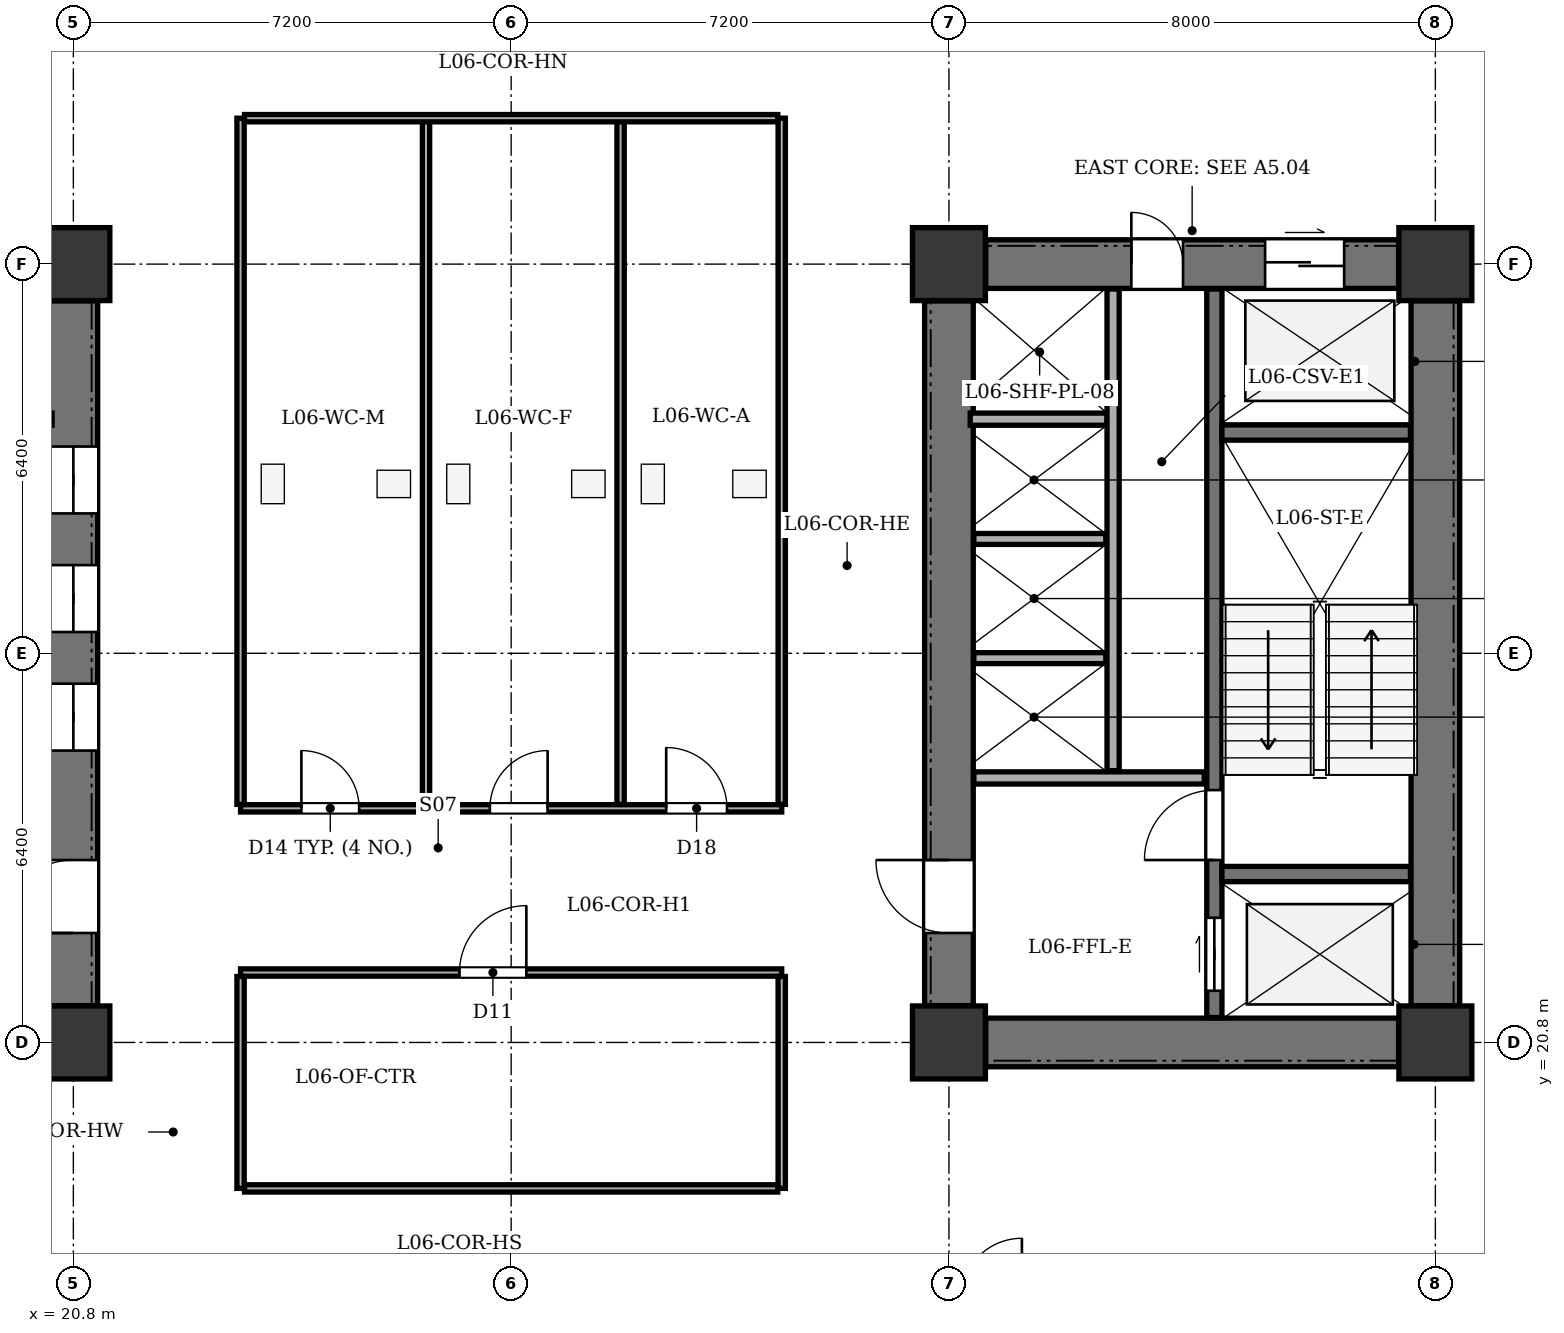
"""IFC4 building model, lengths in metres.
Left out: names, types, materials, properties, quantities, classifications, styles, units other than length and angle.
Written with IfcOpenShell. Run it as: python <this file> out.ifc"""

import sys

from ifc_helpers import new_model, si_unit, direction, frame, frame_2d, origin, origin_2d, place, context, subcontext, project, spatial, rectangle, extrude, element, fill, save


model = new_model("IFC4")
c1 = context("Model", 3, precision=1e-05, world=origin(), true_north=direction((0.0, 1.0)))
c2 = subcontext(c1, "Body", "Model", "MODEL_VIEW")
j1 = project(units=[si_unit("LENGTHUNIT", "METRE"), si_unit("PLANEANGLEUNIT", "RADIAN")], contexts=[c1])
p1 = place(None, origin())
s1 = spatial("IfcSite", under=j1, at=p1, CompositionType="ELEMENT")
p2 = place(p1, origin())
s2 = spatial("IfcBuilding", under=s1, at=p2, CompositionType="ELEMENT")
p3 = place(p2, frame((0.0, 0.0, 28.2)))
s3 = spatial("IfcBuildingStorey", under=s2, at=p3, CompositionType="ELEMENT", Elevation=28.2)
for number, where, z_axis, x_axis in (
    (1, (20.8, 20.8, 0.0), (0.0, 0.0, 1.0), (1.0, 0.0, 0.0)),
    (2, (20.8, 33.6, 0.0), (0.0, 0.0, 1.0), (1.0, 0.0, 0.0)),
    (3, (35.2, 20.8, 0.0), (0.0, 0.0, 1.0), (1.0, 0.0, 0.0)),
    (4, (43.2, 20.8, 0.0), (0.0, 0.0, 1.0), (1.0, 0.0, 0.0)),
    (5, (35.2, 33.6, 0.0), (0.0, 0.0, 1.0), (1.0, 0.0, 0.0)),
    (6, (43.2, 33.6, 0.0), (0.0, 0.0, 1.0), (1.0, 0.0, 0.0)),
):
    element("IfcColumn", number, at=place(p3, frame(where, z_axis=z_axis, x_axis=x_axis)), inside=s3, PredefinedType="COLUMN", context=c2, shape_type="SweptSolid", body=[
        extrude(rectangle(XDim=1.2, YDim=1.2, at=origin_2d()), origin(), (0.0, 0.0, 1.0), 3.9),
    ])
p4 = place(p3, frame((20.8, 21.405, 0.0), z_axis=(0.0, 0.0, 1.0), x_axis=(0.0, 1.0, 0.0)))
e7 = element("IfcWall", 7, at=p4, inside=s3, PredefinedType="SHEAR", context=c2, shape_type="SweptSolid", body=[
    extrude(rectangle(XDim=11.59, YDim=0.8, at=frame_2d((5.795, 0.0))), origin(), (0.0, 0.0, 1.0), 3.6),
])
p5 = place(p4, frame((1.195, 0.0, 0.0)))
e8 = element("IfcOpeningElement", 8, at=p5, cuts=e7, PredefinedType="OPENING", context=c2, shape_type="SweptSolid", body=[
    extrude(rectangle(XDim=1.2, YDim=2.15, at=frame_2d((0.6, 1.075))), frame((0.0, 0.41, 0.0), z_axis=(0.0, -1.0, 0.0), x_axis=(1.0, 0.0, 0.0)), (0.0, 0.0, 1.0), 0.82),
])
p6 = place(p4, frame((4.195, 0.0, 0.0)))
e9 = element("IfcOpeningElement", 9, at=p6, cuts=e7, PredefinedType="OPENING", context=c2, shape_type="SweptSolid", body=[
    extrude(rectangle(XDim=1.1, YDim=2.1, at=frame_2d((0.55, 1.05))), frame((0.0, 0.41, 0.0), z_axis=(0.0, -1.0, 0.0), x_axis=(1.0, 0.0, 0.0)), (0.0, 0.0, 1.0), 0.82),
])
p7 = place(p4, frame((6.145, 0.0, 0.0)))
e10 = element("IfcOpeningElement", 10, at=p7, cuts=e7, PredefinedType="OPENING", context=c2, shape_type="SweptSolid", body=[
    extrude(rectangle(XDim=1.1, YDim=2.1, at=frame_2d((0.55, 1.05))), frame((0.0, 0.41, 0.0), z_axis=(0.0, -1.0, 0.0), x_axis=(1.0, 0.0, 0.0)), (0.0, 0.0, 1.0), 0.82),
])
p8 = place(p4, frame((8.095, 0.0, 0.0)))
e11 = element("IfcOpeningElement", 11, at=p8, cuts=e7, PredefinedType="OPENING", context=c2, shape_type="SweptSolid", body=[
    extrude(rectangle(XDim=1.1, YDim=2.1, at=frame_2d((0.55, 1.05))), frame((0.0, 0.41, 0.0), z_axis=(0.0, -1.0, 0.0), x_axis=(1.0, 0.0, 0.0)), (0.0, 0.0, 1.0), 0.82),
])
p9 = place(p3, frame((43.2, 21.405, 0.0), z_axis=(0.0, 0.0, 1.0), x_axis=(0.0, 1.0, 0.0)))
e12 = element("IfcWall", 12, at=p9, inside=s3, PredefinedType="SHEAR", context=c2, shape_type="SweptSolid", body=[
    extrude(rectangle(XDim=11.59, YDim=0.8, at=frame_2d((5.795, 0.0))), origin(), (0.0, 0.0, 1.0), 3.6),
])
p10 = place(p3, frame((35.805, 20.8, 0.0), z_axis=(0.0, 0.0, 1.0), x_axis=(1.0, 0.0, 0.0)))
e13 = element("IfcWall", 13, at=p10, inside=s3, PredefinedType="SHEAR", context=c2, shape_type="SweptSolid", body=[
    extrude(rectangle(XDim=6.79, YDim=0.8, at=frame_2d((3.395, 0.0))), origin(), (0.0, 0.0, 1.0), 3.6),
])
p11 = place(p3, frame((35.805, 33.6, 0.0), z_axis=(0.0, 0.0, 1.0), x_axis=(1.0, 0.0, 0.0)))
e14 = element("IfcWall", 14, at=p11, inside=s3, PredefinedType="SHEAR", context=c2, shape_type="SweptSolid", body=[
    extrude(rectangle(XDim=6.79, YDim=0.8, at=frame_2d((3.395, 0.0))), origin(), (0.0, 0.0, 1.0), 3.6),
])
p12 = place(p11, frame((4.595, 0.0, 0.0)))
e15 = element("IfcOpeningElement", 15, at=p12, cuts=e14, PredefinedType="OPENING", context=c2, shape_type="SweptSolid", body=[
    extrude(rectangle(XDim=1.3, YDim=2.15, at=frame_2d((0.65, 1.075))), frame((0.0, 0.41, 0.0), z_axis=(0.0, -1.0, 0.0), x_axis=(1.0, 0.0, 0.0)), (0.0, 0.0, 1.0), 0.82),
])
p13 = place(p11, frame((2.395, 0.0, 0.0)))
e16 = element("IfcOpeningElement", 16, at=p13, cuts=e14, PredefinedType="OPENING", context=c2, shape_type="SweptSolid", body=[
    extrude(rectangle(XDim=0.85, YDim=2.02, at=frame_2d((0.425, 1.01))), frame((0.0, 0.41, 0.0), z_axis=(0.0, -1.0, 0.0), x_axis=(1.0, 0.0, 0.0)), (0.0, 0.0, 1.0), 0.82),
])
p14 = place(p3, frame((35.2, 21.405, 0.0), z_axis=(0.0, 0.0, 1.0), x_axis=(0.0, 1.0, 0.0)))
e17 = element("IfcWall", 17, at=p14, inside=s3, PredefinedType="SHEAR", context=c2, shape_type="SweptSolid", body=[
    extrude(rectangle(XDim=11.59, YDim=0.8, at=frame_2d((5.795, 0.0))), origin(), (0.0, 0.0, 1.0), 3.6),
])
p15 = place(p14, frame((1.195, 0.0, 0.0)))
e18 = element("IfcOpeningElement", 18, at=p15, cuts=e17, PredefinedType="OPENING", context=c2, shape_type="SweptSolid", body=[
    extrude(rectangle(XDim=1.2, YDim=2.15, at=frame_2d((0.6, 1.075))), frame((0.0, 0.41, 0.0), z_axis=(0.0, -1.0, 0.0), x_axis=(1.0, 0.0, 0.0)), (0.0, 0.0, 1.0), 0.82),
])
p16 = place(p3, frame((39.565, 21.21, 0.0), z_axis=(0.0, 0.0, 1.0), x_axis=(0.0, 1.0, 0.0)))
e19 = element("IfcWall", 19, at=p16, inside=s3, PredefinedType="SHEAR", context=c2, shape_type="SweptSolid", body=[
    extrude(rectangle(XDim=11.98, YDim=0.25, at=frame_2d((5.99, 0.0))), origin(), (0.0, 0.0, 1.0), 3.6),
])
p17 = place(p16, frame((0.44, 0.0, 0.0)))
e20 = element("IfcOpeningElement", 20, at=p17, cuts=e19, PredefinedType="OPENING", context=c2, shape_type="SweptSolid", body=[
    extrude(rectangle(XDim=1.2, YDim=2.15, at=frame_2d((0.6, 1.075))), frame((0.0, 0.135, 0.0), z_axis=(0.0, -1.0, 0.0), x_axis=(1.0, 0.0, 0.0)), (0.0, 0.0, 1.0), 0.27),
])
p18 = place(p16, frame((2.59, 0.0, 0.0)))
e21 = element("IfcOpeningElement", 21, at=p18, cuts=e19, PredefinedType="OPENING", context=c2, shape_type="SweptSolid", body=[
    extrude(rectangle(XDim=1.15, YDim=2.15, at=frame_2d((0.575, 1.075))), frame((0.0, 0.135, 0.0), z_axis=(0.0, -1.0, 0.0), x_axis=(1.0, 0.0, 0.0)), (0.0, 0.0, 1.0), 0.27),
])
for number, where, z_axis, x_axis in (
    (22, (39.69, 23.57, 0.0), (0.0, 0.0, 1.0), (1.0, 0.0, 0.0)),
    (23, (39.69, 30.83, 0.0), (0.0, 0.0, 1.0), (1.0, 0.0, 0.0)),
):
    element("IfcWall", number, at=place(p3, frame(where, z_axis=z_axis, x_axis=x_axis)), inside=s3, PredefinedType="SHEAR", context=c2, shape_type="SweptSolid", body=[
        extrude(rectangle(XDim=3.1, YDim=0.25, at=frame_2d((1.55, 0.0))), origin(), (0.0, 0.0, 1.0), 3.6),
    ])
p19 = place(p3, frame((35.61, 25.15, 0.0), z_axis=(0.0, 0.0, 1.0), x_axis=(1.0, 0.0, 0.0)))
e24 = element("IfcWall", 24, at=p19, inside=s3, PredefinedType="SOLIDWALL", context=c2, shape_type="SweptSolid", body=[
    extrude(rectangle(XDim=3.79, YDim=0.2, at=frame_2d((1.895, 0.0))), origin(), (0.0, 0.0, 1.0), 3.6),
])
p20 = place(p3, frame((35.55, 31.05, 0.0), z_axis=(0.0, 0.0, 1.0), x_axis=(1.0, 0.0, 0.0)))
e25 = element("IfcWall", 25, at=p20, inside=s3, PredefinedType="SOLIDWALL", context=c2, shape_type="SweptSolid", body=[
    extrude(rectangle(XDim=2.25, YDim=0.2, at=frame_2d((1.125, 0.0))), origin(), (0.0, 0.0, 1.0), 3.6),
])
p21 = place(p3, frame((37.9, 25.27, 0.0), z_axis=(0.0, 0.0, 1.0), x_axis=(0.0, 1.0, 0.0)))
e26 = element("IfcWall", 26, at=p21, inside=s3, PredefinedType="SOLIDWALL", context=c2, shape_type="SweptSolid", body=[
    extrude(rectangle(XDim=7.92, YDim=0.2, at=frame_2d((3.96, 0.0))), origin(), (0.0, 0.0, 1.0), 3.6),
])
for number, where, z_axis, x_axis in (
    (27, (35.61, 27.12, 0.0), (0.0, 0.0, 1.0), (1.0, 0.0, 0.0)),
    (28, (35.61, 29.08, 0.0), (0.0, 0.0, 1.0), (1.0, 0.0, 0.0)),
):
    element("IfcWall", number, at=place(p3, frame(where, z_axis=z_axis, x_axis=x_axis)), inside=s3, PredefinedType="PARTITIONING", context=c2, shape_type="SweptSolid", body=[
        extrude(rectangle(XDim=2.17, YDim=0.18, at=frame_2d((1.085, 0.0))), origin(), (0.0, 0.0, 1.0), 3.6),
    ])
p22 = place(p3, frame((23.55, 24.65, 0.0), z_axis=(0.0, 0.0, 1.0), x_axis=(1.0, 0.0, 0.0)))
e29 = element("IfcWall", 29, at=p22, inside=s3, PredefinedType="PARTITIONING", context=c2, shape_type="SweptSolid", body=[
    extrude(rectangle(XDim=8.9, YDim=0.12, at=frame_2d((4.45, 0.0))), origin(), (0.0, 0.0, 1.0), 3.135),
])
p23 = place(p22, frame((1.0, 0.0, 0.0)))
e30 = element("IfcOpeningElement", 30, at=p23, cuts=e29, PredefinedType="OPENING", context=c2, shape_type="SweptSolid", body=[
    extrude(rectangle(XDim=0.95, YDim=2.1, at=frame_2d((0.475, 1.05))), frame((0.0, 0.07, 0.0), z_axis=(0.0, -1.0, 0.0), x_axis=(1.0, 0.0, 0.0)), (0.0, 0.0, 1.0), 0.14),
])
p24 = place(p22, frame((4.1, 0.0, 0.0)))
e31 = element("IfcOpeningElement", 31, at=p24, cuts=e29, PredefinedType="OPENING", context=c2, shape_type="SweptSolid", body=[
    extrude(rectangle(XDim=0.95, YDim=2.1, at=frame_2d((0.475, 1.05))), frame((0.0, 0.07, 0.0), z_axis=(0.0, -1.0, 0.0), x_axis=(1.0, 0.0, 0.0)), (0.0, 0.0, 1.0), 0.14),
])
p25 = place(p22, frame((7.0, 0.0, 0.0)))
e32 = element("IfcOpeningElement", 32, at=p25, cuts=e29, PredefinedType="OPENING", context=c2, shape_type="SweptSolid", body=[
    extrude(rectangle(XDim=1.0, YDim=2.1, at=frame_2d((0.5, 1.05))), frame((0.0, 0.07, 0.0), z_axis=(0.0, -1.0, 0.0), x_axis=(1.0, 0.0, 0.0)), (0.0, 0.0, 1.0), 0.14),
])
for number, where, z_axis, x_axis in (
    (33, (23.55, 24.715, 0.0), (0.0, 0.0, 1.0), (0.0, 1.0, 0.0)),
    (34, (32.45, 24.715, 0.0), (0.0, 0.0, 1.0), (0.0, 1.0, 0.0)),
    (35, (26.6, 24.715, 0.0), (0.0, 0.0, 1.0), (0.0, 1.0, 0.0)),
):
    element("IfcWall", number, at=place(p3, frame(where, z_axis=z_axis, x_axis=x_axis)), inside=s3, PredefinedType="PARTITIONING", context=c2, shape_type="SweptSolid", body=[
        extrude(rectangle(XDim=11.285, YDim=0.12, at=frame_2d((5.643, 0.0))), origin(), (0.0, 0.0, 1.0), 3.6),
    ])
p26 = place(p3, frame((29.8, 24.715, 0.0), z_axis=(0.0, 0.0, 1.0), x_axis=(0.0, 1.0, 0.0)))
e36 = element("IfcWall", 36, at=p26, inside=s3, PredefinedType="PARTITIONING", context=c2, shape_type="SweptSolid", body=[
    extrude(rectangle(XDim=11.285, YDim=0.12, at=frame_2d((5.643, 0.0))), origin(), (0.0, 0.0, 1.0), 3.135),
])
p27 = place(p3, frame((23.615, 36.0, 0.0), z_axis=(0.0, 0.0, 1.0), x_axis=(1.0, 0.0, 0.0)))
e37 = element("IfcWall", 37, at=p27, inside=s3, PredefinedType="PARTITIONING", context=c2, shape_type="SweptSolid", body=[
    extrude(rectangle(XDim=8.77, YDim=0.12, at=frame_2d((4.385, 0.0))), origin(), (0.0, 0.0, 1.0), 3.6),
])
p28 = place(p3, frame((23.55, 21.95, 0.0), z_axis=(0.0, 0.0, 1.0), x_axis=(1.0, 0.0, 0.0)))
e38 = element("IfcWall", 38, at=p28, inside=s3, PredefinedType="PARTITIONING", context=c2, shape_type="SweptSolid", body=[
    extrude(rectangle(XDim=8.9, YDim=0.12, at=frame_2d((4.45, 0.0))), origin(), (0.0, 0.0, 1.0), 3.135),
])
p29 = place(p28, frame((3.6, 0.0, 0.0)))
e39 = element("IfcOpeningElement", 39, at=p29, cuts=e38, PredefinedType="OPENING", context=c2, shape_type="SweptSolid", body=[
    extrude(rectangle(XDim=1.1, YDim=2.15, at=frame_2d((0.55, 1.075))), frame((0.0, 0.07, 0.0), z_axis=(0.0, -1.0, 0.0), x_axis=(1.0, 0.0, 0.0)), (0.0, 0.0, 1.0), 0.14),
])
for number, where, z_axis, x_axis in (
    (40, (23.55, 18.4, 0.0), (0.0, 0.0, 1.0), (0.0, 1.0, 0.0)),
    (41, (32.45, 18.4, 0.0), (0.0, 0.0, 1.0), (0.0, 1.0, 0.0)),
):
    element("IfcWall", number, at=place(p3, frame(where, z_axis=z_axis, x_axis=x_axis)), inside=s3, PredefinedType="PARTITIONING", context=c2, shape_type="SweptSolid", body=[
        extrude(rectangle(XDim=3.485, YDim=0.12, at=frame_2d((1.743, 0.0))), origin(), (0.0, 0.0, 1.0), 3.6),
    ])
p30 = place(p3, frame((23.615, 18.4, 0.0), z_axis=(0.0, 0.0, 1.0), x_axis=(1.0, 0.0, 0.0)))
e42 = element("IfcWall", 42, at=p30, inside=s3, PredefinedType="PARTITIONING", context=c2, shape_type="SweptSolid", body=[
    extrude(rectangle(XDim=8.77, YDim=0.12, at=frame_2d((4.385, 0.0))), origin(), (0.0, 0.0, 1.0), 3.6),
])
p31 = place(p5, origin())
e43 = element("IfcDoor", 43, at=p31, inside=s3, OperationType="SINGLE_SWING_LEFT", PredefinedType="DOOR", context=c2, shape_type="SweptSolid", body=[
    extrude(rectangle(XDim=1.2, YDim=2.15, at=frame_2d((0.6, 1.075))), frame((0.0, 0.025, 0.0), z_axis=(0.0, -1.0, 0.0), x_axis=(1.0, 0.0, 0.0)), (0.0, 0.0, 1.0), 0.05),
])
fill(e8, e43)
p32 = place(p6, origin())
e44 = element("IfcDoor", 44, at=p32, inside=s3, OperationType="DOUBLE_DOOR_SLIDING", PredefinedType="DOOR", context=c2, shape_type="SweptSolid", body=[
    extrude(rectangle(XDim=1.1, YDim=2.1, at=frame_2d((0.55, 1.05))), frame((0.0, 0.025, 0.0), z_axis=(0.0, -1.0, 0.0), x_axis=(1.0, 0.0, 0.0)), (0.0, 0.0, 1.0), 0.05),
])
fill(e9, e44)
p33 = place(p7, origin())
e45 = element("IfcDoor", 45, at=p33, inside=s3, OperationType="DOUBLE_DOOR_SLIDING", PredefinedType="DOOR", context=c2, shape_type="SweptSolid", body=[
    extrude(rectangle(XDim=1.1, YDim=2.1, at=frame_2d((0.55, 1.05))), frame((0.0, 0.025, 0.0), z_axis=(0.0, -1.0, 0.0), x_axis=(1.0, 0.0, 0.0)), (0.0, 0.0, 1.0), 0.05),
])
fill(e10, e45)
p34 = place(p8, origin())
e46 = element("IfcDoor", 46, at=p34, inside=s3, OperationType="DOUBLE_DOOR_SLIDING", PredefinedType="DOOR", context=c2, shape_type="SweptSolid", body=[
    extrude(rectangle(XDim=1.1, YDim=2.1, at=frame_2d((0.55, 1.05))), frame((0.0, 0.025, 0.0), z_axis=(0.0, -1.0, 0.0), x_axis=(1.0, 0.0, 0.0)), (0.0, 0.0, 1.0), 0.05),
])
fill(e11, e46)
p35 = place(p12, origin())
e47 = element("IfcDoor", 47, at=p35, inside=s3, OperationType="DOUBLE_DOOR_SLIDING", PredefinedType="DOOR", context=c2, shape_type="SweptSolid", body=[
    extrude(rectangle(XDim=1.3, YDim=2.15, at=frame_2d((0.65, 1.075))), frame((0.0, 0.025, 0.0), z_axis=(0.0, -1.0, 0.0), x_axis=(1.0, 0.0, 0.0)), (0.0, 0.0, 1.0), 0.05),
])
fill(e15, e47)
p36 = place(p13, origin())
e48 = element("IfcDoor", 48, at=p36, inside=s3, OperationType="SINGLE_SWING_LEFT", PredefinedType="DOOR", context=c2, shape_type="SweptSolid", body=[
    extrude(rectangle(XDim=0.85, YDim=2.02, at=frame_2d((0.425, 1.01))), frame((0.0, 0.025, 0.0), z_axis=(0.0, -1.0, 0.0), x_axis=(1.0, 0.0, 0.0)), (0.0, 0.0, 1.0), 0.05),
])
fill(e16, e48)
p37 = place(p15, origin())
e49 = element("IfcDoor", 49, at=p37, inside=s3, OperationType="SINGLE_SWING_RIGHT", PredefinedType="DOOR", context=c2, shape_type="SweptSolid", body=[
    extrude(rectangle(XDim=1.2, YDim=2.15, at=frame_2d((0.6, 1.075))), frame((0.0, 0.025, 0.0), z_axis=(0.0, -1.0, 0.0), x_axis=(1.0, 0.0, 0.0)), (0.0, 0.0, 1.0), 0.05),
])
fill(e18, e49)
p38 = place(p17, origin())
e50 = element("IfcDoor", 50, at=p38, inside=s3, OperationType="DOUBLE_DOOR_SLIDING", PredefinedType="DOOR", context=c2, shape_type="SweptSolid", body=[
    extrude(rectangle(XDim=1.2, YDim=2.15, at=frame_2d((0.6, 1.075))), frame((0.0, 0.025, 0.0), z_axis=(0.0, -1.0, 0.0), x_axis=(1.0, 0.0, 0.0)), (0.0, 0.0, 1.0), 0.05),
])
fill(e20, e50)
p39 = place(p18, origin())
e51 = element("IfcDoor", 51, at=p39, inside=s3, OperationType="SINGLE_SWING_LEFT", PredefinedType="DOOR", context=c2, shape_type="SweptSolid", body=[
    extrude(rectangle(XDim=1.15, YDim=2.15, at=frame_2d((0.575, 1.075))), frame((0.0, 0.025, 0.0), z_axis=(0.0, -1.0, 0.0), x_axis=(1.0, 0.0, 0.0)), (0.0, 0.0, 1.0), 0.05),
])
fill(e21, e51)
p40 = place(p23, origin())
e52 = element("IfcDoor", 52, at=p40, inside=s3, OperationType="SINGLE_SWING_LEFT", PredefinedType="DOOR", context=c2, shape_type="SweptSolid", body=[
    extrude(rectangle(XDim=0.95, YDim=2.1, at=frame_2d((0.475, 1.05))), frame((0.0, 0.025, 0.0), z_axis=(0.0, -1.0, 0.0), x_axis=(1.0, 0.0, 0.0)), (0.0, 0.0, 1.0), 0.05),
])
fill(e30, e52)
p41 = place(p24, origin())
e53 = element("IfcDoor", 53, at=p41, inside=s3, OperationType="SINGLE_SWING_RIGHT", PredefinedType="DOOR", context=c2, shape_type="SweptSolid", body=[
    extrude(rectangle(XDim=0.95, YDim=2.1, at=frame_2d((0.475, 1.05))), frame((0.0, 0.025, 0.0), z_axis=(0.0, -1.0, 0.0), x_axis=(1.0, 0.0, 0.0)), (0.0, 0.0, 1.0), 0.05),
])
fill(e31, e53)
p42 = place(p25, origin())
e54 = element("IfcDoor", 54, at=p42, inside=s3, OperationType="SINGLE_SWING_LEFT", PredefinedType="DOOR", context=c2, shape_type="SweptSolid", body=[
    extrude(rectangle(XDim=1.0, YDim=2.1, at=frame_2d((0.5, 1.05))), frame((0.0, 0.025, 0.0), z_axis=(0.0, -1.0, 0.0), x_axis=(1.0, 0.0, 0.0)), (0.0, 0.0, 1.0), 0.05),
])
fill(e32, e54)
p43 = place(p29, origin())
e55 = element("IfcDoor", 55, at=p43, inside=s3, OperationType="SINGLE_SWING_RIGHT", PredefinedType="DOOR", context=c2, shape_type="SweptSolid", body=[
    extrude(rectangle(XDim=1.1, YDim=2.15, at=frame_2d((0.55, 1.075))), frame((0.0, 0.025, 0.0), z_axis=(0.0, -1.0, 0.0), x_axis=(1.0, 0.0, 0.0)), (0.0, 0.0, 1.0), 0.05),
])
fill(e39, e55)
save(model, sys.argv[1])
